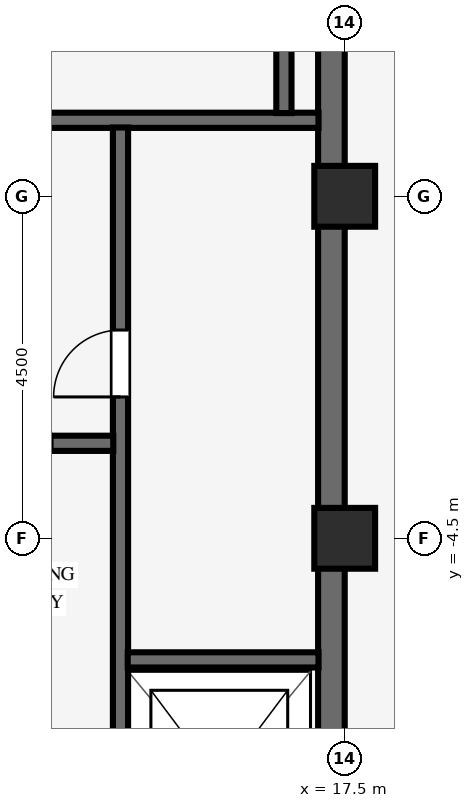
"""IFC4 building model, lengths in metres.
Left out: names, types, materials, properties, quantities, classifications, styles, units other than length and angle.
Written with IfcOpenShell. Run it as: python <this file> out.ifc"""

import sys

from ifc_helpers import new_model, si_unit, direction, frame, frame_2d, origin, origin_2d, place, context, subcontext, project, spatial, rectangle, extrude, source, transform, mapped, element, fill, save


model = new_model("IFC4")
c1 = context("Model", 3, precision=1e-05, world=origin(), true_north=direction((0.0, 1.0)))
c2 = subcontext(c1, "Body", "Model", "MODEL_VIEW")
j1 = project(units=[si_unit("LENGTHUNIT", "METRE"), si_unit("PLANEANGLEUNIT", "RADIAN")], contexts=[c1])
p1 = place(None, origin())
s1 = spatial("IfcSite", under=j1, at=p1, CompositionType="ELEMENT")
p2 = place(p1, origin())
s2 = spatial("IfcBuilding", under=s1, at=p2, CompositionType="ELEMENT")
p3 = place(p2, frame((0.0, 0.0, 231.05)))
s3 = spatial("IfcBuildingStorey", under=s2, at=p3, CompositionType="ELEMENT", Elevation=231.05)
p4 = place(p3, frame((17.325, -9.255, 0.0), z_axis=(0.0, 0.0, 1.0), x_axis=(0.0, 1.0, 0.0)))
e1 = element("IfcWall", 1, at=p4, inside=s3, PredefinedType="SHEAR", context=c2, shape_type="SweptSolid", body=[
    extrude(rectangle(XDim=18.51, YDim=0.35, at=frame_2d((9.255, 0.0))), origin(), (0.0, 0.0, 1.0), 3.37),
])
for number, where, z_axis, x_axis in (
    (2, (17.5, -4.5, 0.0), (0.0, 0.0, 1.0), (1.0, 0.0, 0.0)),
    (3, (17.5, 0.0, 0.0), (0.0, 0.0, 1.0), (1.0, 0.0, 0.0)),
):
    element("IfcColumn", number, at=place(p3, frame(where, z_axis=z_axis, x_axis=x_axis)), inside=s3, PredefinedType="COLUMN", context=c2, shape_type="SweptSolid", body=[
        extrude(rectangle(XDim=0.8, YDim=0.8, at=origin_2d()), origin(), (0.0, 0.0, 1.0), 3.37),
    ])
p5 = place(p3, frame((13.535, 1.0, 0.0), z_axis=(0.0, 0.0, 1.0), x_axis=(1.0, 0.0, 0.0)))
e4 = element("IfcWall", 4, at=p5, inside=s3, PredefinedType="SHEAR", context=c2, shape_type="SweptSolid", body=[
    extrude(rectangle(XDim=3.62, YDim=0.2, at=frame_2d((1.81, 0.0))), origin(), (0.0, 0.0, 1.0), 3.37),
])
p6 = place(p3, frame((16.7, 1.095, 0.0), z_axis=(0.0, 0.0, 1.0), x_axis=(0.0, 1.0, 0.0)))
e5 = element("IfcWall", 5, at=p6, inside=s3, PredefinedType="SHEAR", context=c2, shape_type="SweptSolid", body=[
    extrude(rectangle(XDim=8.16, YDim=0.2, at=frame_2d((4.08, 0.0))), origin(), (0.0, 0.0, 1.0), 3.37),
])
p7 = place(p3, frame((14.55, -9.255, 0.0), z_axis=(0.0, 0.0, 1.0), x_axis=(0.0, 1.0, 0.0)))
e6 = element("IfcWall", 6, at=p7, inside=s3, PredefinedType="SHEAR", context=c2, shape_type="SweptSolid", body=[
    extrude(rectangle(XDim=10.16, YDim=0.2, at=frame_2d((5.08, 0.0))), origin(), (0.0, 0.0, 1.0), 3.37),
])
p8 = place(p7, frame((6.615, 0.0, 0.0)))
e7 = element("IfcOpeningElement", 7, at=p8, cuts=e6, PredefinedType="OPENING", context=c2, shape_type="SweptSolid", body=[
    extrude(rectangle(XDim=0.88, YDim=2.1, at=frame_2d((0.44, 1.05))), frame((0.0, 0.11, 0.0), z_axis=(0.0, -1.0, 0.0), x_axis=(1.0, 0.0, 0.0)), (0.0, 0.0, 1.0), 0.22),
])
p9 = place(p7, frame((0.98, 0.0, 0.0)))
e8 = element("IfcOpeningElement", 8, at=p9, cuts=e6, PredefinedType="OPENING", context=c2, shape_type="SweptSolid", body=[
    extrude(rectangle(XDim=1.15, YDim=2.15, at=frame_2d((0.575, 1.075))), frame((0.0, 0.11, 0.0), z_axis=(0.0, -1.0, 0.0), x_axis=(1.0, 0.0, 0.0)), (0.0, 0.0, 1.0), 0.22),
])
p10 = place(p3, frame((14.645, -6.1, 0.0), z_axis=(0.0, 0.0, 1.0), x_axis=(1.0, 0.0, 0.0)))
e9 = element("IfcWall", 9, at=p10, inside=s3, PredefinedType="SHEAR", context=c2, shape_type="SweptSolid", body=[
    extrude(rectangle(XDim=2.51, YDim=0.2, at=frame_2d((1.255, 0.0))), origin(), (0.0, 0.0, 1.0), 3.37),
])
p11 = place(p3, frame((11.695, -3.25, 0.0), z_axis=(0.0, 0.0, 1.0), x_axis=(1.0, 0.0, 0.0)))
e10 = element("IfcWall", 10, at=p11, inside=s3, PredefinedType="SHEAR", context=c2, shape_type="SweptSolid", body=[
    extrude(rectangle(XDim=2.76, YDim=0.2, at=frame_2d((1.38, 0.0))), origin(), (0.0, 0.0, 1.0), 3.37),
])
p12 = place(p11, frame((0.755, 0.0, 0.0)))
e11 = element("IfcOpeningElement", 11, at=p12, cuts=e10, PredefinedType="OPENING", context=c2, shape_type="SweptSolid", body=[
    extrude(rectangle(XDim=1.2, YDim=2.15, at=frame_2d((0.6, 1.075))), frame((0.0, 0.11, 0.0), z_axis=(0.0, -1.0, 0.0), x_axis=(1.0, 0.0, 0.0)), (0.0, 0.0, 1.0), 0.22),
])
m1 = source(origin(), c2, "Body", "SweptSolid", [
    extrude(rectangle(XDim=0.88, YDim=2.1, at=frame_2d((0.44, 1.05))), frame((0.0, 0.025, 0.0), z_axis=(0.0, -1.0, 0.0), x_axis=(1.0, 0.0, 0.0)), (0.0, 0.0, 1.0), 0.05),
])
p13 = place(p8, origin())
e12 = element("IfcDoor", 12, at=p13, inside=s3, OperationType="SINGLE_SWING_LEFT", PredefinedType="DOOR", context=c2, shape_type="MappedRepresentation", body=[
    mapped(m1, transform((0.0, 0.0, 0.0), scale=1.0)),
])
fill(e7, e12)
m2 = source(origin(), c2, "Body", "SweptSolid", [
    extrude(rectangle(XDim=1.2, YDim=2.15, at=frame_2d((0.6, 1.075))), frame((0.0, 0.025, 0.0), z_axis=(0.0, -1.0, 0.0), x_axis=(1.0, 0.0, 0.0)), (0.0, 0.0, 1.0), 0.05),
])
p14 = place(p12, origin())
e13 = element("IfcDoor", 13, at=p14, inside=s3, OperationType="SINGLE_SWING_LEFT", PredefinedType="DOOR", context=c2, shape_type="MappedRepresentation", body=[
    mapped(m2, transform((0.0, 0.0, 0.0), scale=1.0)),
])
fill(e11, e13)
save(model, sys.argv[1])
